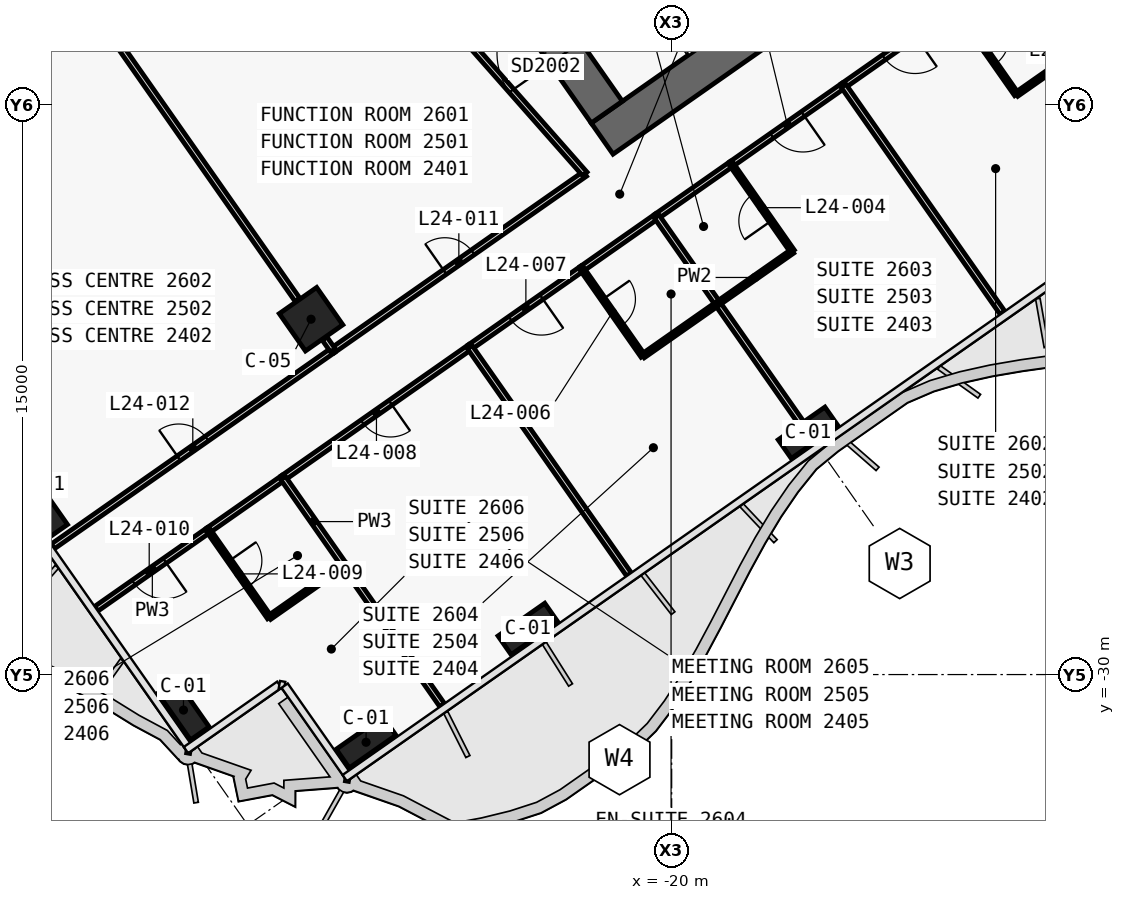
"""IFC4 building model, lengths in metres.
Left out: names, types, materials, properties, quantities, classifications, styles, units other than length and angle.
Written with IfcOpenShell. Run it as: python <this file> out.ifc"""

import sys

from ifc_helpers import new_model, si_unit, direction, frame, frame_2d, origin, origin_2d, place, context, subcontext, project, spatial, polyline, rectangle, outline, extrude, element, fill, save


model = new_model("IFC4")
c1 = context("Model", 3, precision=1e-05, world=origin(), true_north=direction((0.0, 1.0)))
c2 = subcontext(c1, "Body", "Model", "MODEL_VIEW")
j1 = project(units=[si_unit("LENGTHUNIT", "METRE"), si_unit("PLANEANGLEUNIT", "RADIAN")], contexts=[c1])
p1 = place(None, origin())
s1 = spatial("IfcSite", under=j1, at=p1, CompositionType="ELEMENT")
p2 = place(p1, origin())
s2 = spatial("IfcBuilding", under=s1, at=p2, CompositionType="ELEMENT")
p3 = place(p2, frame((0.0, 0.0, 112.1)))
s3 = spatial("IfcBuildingStorey", under=s2, at=p3, CompositionType="ELEMENT", Elevation=112.1)
p4 = place(p3, frame((0.037, -0.585, 0.0), z_axis=(0.0, 0.0, 1.0), x_axis=(-0.819157152511, -0.573569140985, 0.0)))
e1 = element("IfcWall", 1, at=p4, inside=s3, PredefinedType="SHEAR", context=c2, shape_type="SweptSolid", body=[
    extrude(outline(polyline([(26.695, 0.5), (0.7, 0.5), (0.0, -0.5), (26.695, -0.5), (26.695, 0.5)])), origin(), (0.0, 0.0, 1.0), 3.6),
])
p5 = place(p4, frame((2.995, 0.0, 0.0)))
e2 = element("IfcOpeningElement", 2, at=p5, cuts=e1, PredefinedType="OPENING", context=c2, shape_type="SweptSolid", body=[
    extrude(rectangle(XDim=2.4, YDim=2.1, at=frame_2d((1.2, 1.05))), frame((0.0, 0.51, 0.0), z_axis=(0.0, -1.0, 0.0), x_axis=(1.0, 0.0, 0.0)), (0.0, 0.0, 1.0), 1.02),
])
p6 = place(p4, frame((11.995, 0.0, 0.0)))
e3 = element("IfcOpeningElement", 3, at=p6, cuts=e1, PredefinedType="OPENING", context=c2, shape_type="SweptSolid", body=[
    extrude(rectangle(XDim=2.4, YDim=2.1, at=frame_2d((1.2, 1.05))), frame((0.0, 0.51, 0.0), z_axis=(0.0, -1.0, 0.0), x_axis=(1.0, 0.0, 0.0)), (0.0, 0.0, 1.0), 1.02),
])
p7 = place(p3, frame((-21.708, -15.2, 0.0), z_axis=(0.0, 0.0, 1.0), x_axis=(-0.573576324356, 0.819152122709, 0.0)))
e4 = element("IfcWall", 4, at=p7, inside=s3, PredefinedType="SHEAR", context=c2, shape_type="SweptSolid", body=[
    extrude(outline(polyline([(0.0, 0.5), (0.0, -0.5), (9.2, -0.5), (9.2, 0.5), (0.0, 0.5)])), origin(), (0.0, 0.0, 1.0), 3.6),
])
p8 = place(p7, frame((6.1, 0.0, 0.0)))
e5 = element("IfcOpeningElement", 5, at=p8, cuts=e4, PredefinedType="OPENING", context=c2, shape_type="SweptSolid", body=[
    extrude(rectangle(XDim=1.8, YDim=2.1, at=frame_2d((0.9, 1.05))), frame((0.0, 0.51, 0.0), z_axis=(0.0, -1.0, 0.0), x_axis=(1.0, 0.0, 0.0)), (0.0, 0.0, 1.0), 1.02),
])
p9 = place(p7, frame((1.9, 0.0, 0.0)))
e6 = element("IfcOpeningElement", 6, at=p9, cuts=e4, PredefinedType="OPENING", context=c2, shape_type="SweptSolid", body=[
    extrude(rectangle(XDim=1.8, YDim=2.1, at=frame_2d((0.9, 1.05))), frame((0.0, 0.51, 0.0), z_axis=(0.0, -1.0, 0.0), x_axis=(1.0, 0.0, 0.0)), (0.0, 0.0, 1.0), 1.02),
])
for number, where, z_axis, x_axis in (
    (7, (-16.41, -23.637, 0.0), (0.0, 0.0, 1.0), (-0.819, -0.574, 0.0)),
    (8, (-23.782, -28.799, 0.0), (0.0, 0.0, 1.0), (-0.819, -0.574, 0.0)),
    (9, (-28.042, -31.782, 0.0), (0.0, 0.0, 1.0), (-0.819, -0.574, 0.0)),
    (10, (-32.847, -30.935, 0.0), (0.0, 0.0, 1.0), (-0.574, 0.819, 0.0)),
    (11, (-36.575, -25.61, 0.0), (0.0, 0.0, 1.0), (-0.574, 0.819, 0.0)),
):
    element("IfcColumn", number, at=place(p3, frame(where, z_axis=z_axis, x_axis=x_axis)), inside=s3, PredefinedType="COLUMN", context=c2, shape_type="SweptSolid", body=[
        extrude(rectangle(XDim=1.5, YDim=0.6, at=origin_2d()), origin(), (0.0, 0.0, 1.0), 3.6),
    ])
p10 = place(p3, frame((-29.49, -20.649, 0.0), z_axis=(0.0, 0.0, 1.0), x_axis=(-0.819152044289, -0.573576436351, 0.0)))
e12 = element("IfcColumn", 12, at=p10, inside=s3, PredefinedType="COLUMN", context=c2, shape_type="SweptSolid", body=[
    extrude(rectangle(XDim=1.2, YDim=1.2, at=origin_2d()), origin(), (0.0, 0.0, 1.0), 3.6),
])
p11 = place(p3, frame((-28.917, -21.469, 0.0), z_axis=(0.0, 0.0, 1.0), x_axis=(0.819152599934, 0.573575642807, 0.0)))
e13 = element("IfcWall", 13, at=p11, inside=s3, PredefinedType="PARTITIONING", context=c2, shape_type="SweptSolid", body=[
    extrude(rectangle(XDim=8.098, YDim=0.15, at=frame_2d((4.049, 0.0))), origin(), (0.0, 0.0, 1.0), 2.6),
])
p12 = place(p11, frame((3.599, 0.0, 0.0)))
e14 = element("IfcOpeningElement", 14, at=p12, cuts=e13, PredefinedType="OPENING", context=c2, shape_type="SweptSolid", body=[
    extrude(rectangle(XDim=0.9, YDim=2.1, at=frame_2d((0.45, 1.05))), frame((0.0, 0.085, 0.0), z_axis=(0.0, -1.0, 0.0), x_axis=(1.0, 0.0, 0.0)), (0.0, 0.0, 1.0), 0.17),
])
p13 = place(p3, frame((-36.288, -26.63, 0.0), z_axis=(0.0, 0.0, 1.0), x_axis=(0.81915291695, 0.57357519006, 0.0)))
e15 = element("IfcWall", 15, at=p13, inside=s3, PredefinedType="PARTITIONING", context=c2, shape_type="SweptSolid", body=[
    extrude(rectangle(XDim=9.002, YDim=0.15, at=frame_2d((4.501, 0.0))), origin(), (0.0, 0.0, 1.0), 2.5),
])
p14 = place(p13, frame((4.051, 0.0, 0.0)))
e16 = element("IfcOpeningElement", 16, at=p14, cuts=e15, PredefinedType="OPENING", context=c2, shape_type="SweptSolid", body=[
    extrude(rectangle(XDim=0.9, YDim=2.1, at=frame_2d((0.45, 1.05))), frame((0.0, 0.085, 0.0), z_axis=(0.0, -1.0, 0.0), x_axis=(1.0, 0.0, 0.0)), (0.0, 0.0, 1.0), 0.17),
])
p15 = place(p3, frame((-12.532, -12.437, 0.0), z_axis=(0.0, 0.0, 1.0), x_axis=(-0.819145961204, -0.573585123798, 0.0)))
e17 = element("IfcWall", 17, at=p15, inside=s3, PredefinedType="PARTITIONING", context=c2, shape_type="SweptSolid", body=[
    extrude(rectangle(XDim=3.603, YDim=0.15, at=frame_2d((1.802, 0.0))), origin(), (0.0, 0.0, 1.0), 2.6),
])
p16 = place(p15, frame((1.301, 0.0, 0.0)))
e18 = element("IfcOpeningElement", 18, at=p16, cuts=e17, PredefinedType="OPENING", context=c2, shape_type="SweptSolid", body=[
    extrude(rectangle(XDim=1.0, YDim=2.1, at=frame_2d((0.5, 1.05))), frame((0.0, 0.085, 0.0), z_axis=(0.0, -1.0, 0.0), x_axis=(1.0, 0.0, 0.0)), (0.0, 0.0, 1.0), 0.17),
])
p17 = place(p3, frame((-15.48, -14.501, 0.0), z_axis=(0.0, 0.0, 1.0), x_axis=(-0.819145961204, -0.573585123798, 0.0)))
e19 = element("IfcWall", 19, at=p17, inside=s3, PredefinedType="PARTITIONING", context=c2, shape_type="SweptSolid", body=[
    extrude(rectangle(XDim=3.603, YDim=0.15, at=frame_2d((1.802, 0.0))), origin(), (0.0, 0.0, 1.0), 3.32),
])
p18 = place(p17, frame((1.302, 0.0, 0.0)))
e20 = element("IfcOpeningElement", 20, at=p18, cuts=e19, PredefinedType="OPENING", context=c2, shape_type="SweptSolid", body=[
    extrude(rectangle(XDim=1.0, YDim=2.1, at=frame_2d((0.5, 1.05))), frame((0.0, 0.085, 0.0), z_axis=(0.0, -1.0, 0.0), x_axis=(1.0, 0.0, 0.0)), (0.0, 0.0, 1.0), 0.17),
])
p19 = place(p3, frame((-18.429, -16.566, 0.0), z_axis=(0.0, 0.0, 1.0), x_axis=(-0.819146032251, -0.573585022335, 0.0)))
e21 = element("IfcWall", 21, at=p19, inside=s3, PredefinedType="PARTITIONING", context=c2, shape_type="SweptSolid", body=[
    extrude(rectangle(XDim=2.404, YDim=0.15, at=frame_2d((1.202, 0.0))), origin(), (0.0, 0.0, 1.0), 2.6),
])
p20 = place(p3, frame((-22.362, -19.32, 0.0), z_axis=(0.0, 0.0, 1.0), x_axis=(-0.819145961204, -0.573585123798, 0.0)))
e22 = element("IfcWall", 22, at=p20, inside=s3, PredefinedType="PARTITIONING", context=c2, shape_type="SweptSolid", body=[
    extrude(rectangle(XDim=3.603, YDim=0.15, at=frame_2d((1.802, 0.0))), origin(), (0.0, 0.0, 1.0), 3.32),
])
p21 = place(p20, frame((1.301, 0.0, 0.0)))
e23 = element("IfcOpeningElement", 23, at=p21, cuts=e22, PredefinedType="OPENING", context=c2, shape_type="SweptSolid", body=[
    extrude(rectangle(XDim=1.0, YDim=2.1, at=frame_2d((0.5, 1.05))), frame((0.0, 0.085, 0.0), z_axis=(0.0, -1.0, 0.0), x_axis=(1.0, 0.0, 0.0)), (0.0, 0.0, 1.0), 0.17),
])
p22 = place(p3, frame((-20.395, -17.943, 0.0), z_axis=(0.0, 0.0, 1.0), x_axis=(-0.819146032251, -0.573585022335, 0.0)))
e24 = element("IfcWall", 24, at=p22, inside=s3, PredefinedType="PARTITIONING", context=c2, shape_type="SweptSolid", body=[
    extrude(rectangle(XDim=2.404, YDim=0.15, at=frame_2d((1.202, 0.0))), origin(), (0.0, 0.0, 1.0), 2.6),
])
p23 = place(p3, frame((-25.31, -21.384, 0.0), z_axis=(0.0, 0.0, 1.0), x_axis=(-0.819145946981, -0.573585144111, 0.0)))
e25 = element("IfcWall", 25, at=p23, inside=s3, PredefinedType="PARTITIONING", context=c2, shape_type="SweptSolid", body=[
    extrude(rectangle(XDim=6.004, YDim=0.15, at=frame_2d((3.002, 0.0))), origin(), (0.0, 0.0, 1.0), 2.6),
])
p24 = place(p23, frame((2.552, 0.0, 0.0)))
e26 = element("IfcOpeningElement", 26, at=p24, cuts=e25, PredefinedType="OPENING", context=c2, shape_type="SweptSolid", body=[
    extrude(rectangle(XDim=0.9, YDim=2.1, at=frame_2d((0.45, 1.05))), frame((0.0, 0.085, 0.0), z_axis=(0.0, -1.0, 0.0), x_axis=(1.0, 0.0, 0.0)), (0.0, 0.0, 1.0), 0.17),
])
p25 = place(p3, frame((-32.191, -26.203, 0.0), z_axis=(0.0, 0.0, 1.0), x_axis=(-0.819149096931, -0.573580645591, 0.0)))
e27 = element("IfcWall", 27, at=p25, inside=s3, PredefinedType="PARTITIONING", context=c2, shape_type="SweptSolid", body=[
    extrude(rectangle(XDim=3.601, YDim=0.15, at=frame_2d((1.8, 0.0))), origin(), (0.0, 0.0, 1.0), 2.5),
])
p26 = place(p25, frame((1.401, 0.0, 0.0)))
e28 = element("IfcOpeningElement", 28, at=p26, cuts=e27, PredefinedType="OPENING", context=c2, shape_type="SweptSolid", body=[
    extrude(rectangle(XDim=1.0, YDim=2.1, at=frame_2d((0.5, 1.05))), frame((0.0, 0.085, 0.0), z_axis=(0.0, -1.0, 0.0), x_axis=(1.0, 0.0, 0.0)), (0.0, 0.0, 1.0), 0.17),
])
p27 = place(p3, frame((-30.225, -24.826, 0.0), z_axis=(0.0, 0.0, 1.0), x_axis=(-0.819146032251, -0.573585022335, 0.0)))
e29 = element("IfcWall", 29, at=p27, inside=s3, PredefinedType="PARTITIONING", context=c2, shape_type="SweptSolid", body=[
    extrude(rectangle(XDim=2.404, YDim=0.15, at=frame_2d((1.202, 0.0))), origin(), (0.0, 0.0, 1.0), 3.32),
])
p28 = place(p3, frame((-22.284, -16.827, 0.0), z_axis=(0.0, 0.0, 1.0), x_axis=(-0.661545117561, 0.749905365651, 0.0)))
e30 = element("IfcWall", 30, at=p28, inside=s3, PredefinedType="PARTITIONING", context=c2, shape_type="SweptSolid", body=[
    extrude(rectangle(XDim=6.543, YDim=0.15, at=frame_2d((3.271, 0.0))), origin(), (0.0, 0.0, 1.0), 2.6),
])
p29 = place(p3, frame((-28.916, -21.468, 0.0), z_axis=(0.0, 0.0, 1.0), x_axis=(-0.572944929411, 0.819593867633, 0.0)))
e31 = element("IfcWall", 31, at=p29, inside=s3, PredefinedType="PARTITIONING", context=c2, shape_type="SweptSolid", body=[
    extrude(rectangle(XDim=0.38, YDim=0.15, at=frame_2d((0.19, 0.0))), origin(), (0.0, 0.0, 1.0), 2.6),
])
p30 = place(p3, frame((-29.845, -20.141, 0.0), z_axis=(0.0, 0.0, 1.0), x_axis=(-0.573558725113, 0.819164445546, 0.0)))
e32 = element("IfcWall", 32, at=p30, inside=s3, PredefinedType="PARTITIONING", context=c2, shape_type="SweptSolid", body=[
    extrude(rectangle(XDim=9.01, YDim=0.15, at=frame_2d((4.505, 0.0))), origin(), (0.0, 0.0, 1.0), 2.6),
])
p31 = place(p3, frame((-12.533, -12.438, 0.0), z_axis=(0.0, 0.0, 1.0), x_axis=(0.573550118428, -0.819170471667, 0.0)))
e33 = element("IfcWall", 33, at=p31, inside=s3, PredefinedType="PARTITIONING", context=c2, shape_type="SweptSolid", body=[
    extrude(rectangle(XDim=2.8, YDim=0.12, at=frame_2d((1.4, 0.0))), origin(), (0.0, 0.0, 1.0), 3.32),
])
p32 = place(p31, frame((0.975, 0.0, 0.0)))
e34 = element("IfcOpeningElement", 34, at=p32, cuts=e33, PredefinedType="OPENING", context=c2, shape_type="SweptSolid", body=[
    extrude(rectangle(XDim=0.85, YDim=2.05, at=frame_2d((0.425, 1.025))), frame((0.0, 0.07, 0.0), z_axis=(0.0, -1.0, 0.0), x_axis=(1.0, 0.0, 0.0)), (0.0, 0.0, 1.0), 0.14),
])
p33 = place(p3, frame((-10.926, -14.732, 0.0), z_axis=(0.0, 0.0, 1.0), x_axis=(0.819107643868, 0.573639841501, 0.0)))
e35 = element("IfcWall", 35, at=p33, inside=s3, PredefinedType="PARTITIONING", context=c2, shape_type="SweptSolid", body=[
    extrude(rectangle(XDim=2.4, YDim=0.12, at=frame_2d((1.2, 0.0))), origin(), (0.0, 0.0, 1.0), 3.32),
])
p34 = place(p3, frame((-11.294, -20.482, 0.0), z_axis=(0.0, 0.0, 1.0), x_axis=(-0.573572324301, 0.819154923562, 0.0)))
e36 = element("IfcWall", 36, at=p34, inside=s3, PredefinedType="PARTITIONING", context=c2, shape_type="SweptSolid", body=[
    extrude(rectangle(XDim=7.3, YDim=0.15, at=frame_2d((3.65, 0.0))), origin(), (0.0, 0.0, 1.0), 2.5),
])
p35 = place(p3, frame((-18.79, -20.239, 0.0), z_axis=(0.0, 0.0, 1.0), x_axis=(0.819141114317, 0.573592045652, 0.0)))
e37 = element("IfcWall", 37, at=p35, inside=s3, PredefinedType="PARTITIONING", context=c2, shape_type="SweptSolid", body=[
    extrude(rectangle(XDim=2.4, YDim=0.12, at=frame_2d((1.2, 0.0))), origin(), (0.0, 0.0, 1.0), 2.6),
])
p36 = place(p3, frame((-16.823, -18.861, 0.0), z_axis=(0.0, 0.0, 1.0), x_axis=(-0.573608623498, 0.819129505664, 0.0)))
e38 = element("IfcWall", 38, at=p36, inside=s3, PredefinedType="PARTITIONING", context=c2, shape_type="SweptSolid", body=[
    extrude(rectangle(XDim=2.8, YDim=0.12, at=frame_2d((1.4, 0.0))), origin(), (0.0, 0.0, 1.0), 3.32),
])
p37 = place(p36, frame((0.975, 0.0, 0.0)))
e39 = element("IfcOpeningElement", 39, at=p37, cuts=e38, PredefinedType="OPENING", context=c2, shape_type="SweptSolid", body=[
    extrude(rectangle(XDim=0.85, YDim=2.05, at=frame_2d((0.425, 1.025))), frame((0.0, 0.07, 0.0), z_axis=(0.0, -1.0, 0.0), x_axis=(1.0, 0.0, 0.0)), (0.0, 0.0, 1.0), 0.14),
])
p38 = place(p3, frame((-16.594, -23.375, 0.0), z_axis=(0.0, 0.0, 1.0), x_axis=(-0.573594994199, 0.819139049631, 0.0)))
e40 = element("IfcWall", 40, at=p38, inside=s3, PredefinedType="PARTITIONING", context=c2, shape_type="SweptSolid", body=[
    extrude(rectangle(XDim=3.829, YDim=0.15, at=frame_2d((1.915, 0.0))), origin(), (0.0, 0.0, 1.0), 2.6),
])
p39 = place(p3, frame((-18.79, -20.238, 0.0), z_axis=(0.0, 0.0, 1.0), x_axis=(-0.57364959175, 0.819100815459, 0.0)))
e41 = element("IfcWall", 41, at=p39, inside=s3, PredefinedType="PARTITIONING", context=c2, shape_type="SweptSolid", body=[
    extrude(rectangle(XDim=2.8, YDim=0.15, at=frame_2d((1.4, 0.0))), origin(), (0.0, 0.0, 1.0), 2.6),
])
p40 = place(p3, frame((-22.363, -19.321, 0.0), z_axis=(0.0, 0.0, 1.0), x_axis=(0.57364959175, -0.819100815459, 0.0)))
e42 = element("IfcWall", 42, at=p40, inside=s3, PredefinedType="PARTITIONING", context=c2, shape_type="SweptSolid", body=[
    extrude(rectangle(XDim=2.8, YDim=0.12, at=frame_2d((1.4, 0.0))), origin(), (0.0, 0.0, 1.0), 3.32),
])
p41 = place(p40, frame((0.975, 0.0, 0.0)))
e43 = element("IfcOpeningElement", 43, at=p41, cuts=e42, PredefinedType="OPENING", context=c2, shape_type="SweptSolid", body=[
    extrude(rectangle(XDim=0.85, YDim=2.05, at=frame_2d((0.425, 1.025))), frame((0.0, 0.07, 0.0), z_axis=(0.0, -1.0, 0.0), x_axis=(1.0, 0.0, 0.0)), (0.0, 0.0, 1.0), 0.14),
])
p42 = place(p3, frame((-20.756, -21.615, 0.0), z_axis=(0.0, 0.0, 1.0), x_axis=(0.819188907105, 0.573523787192, 0.0)))
e44 = element("IfcWall", 44, at=p42, inside=s3, PredefinedType="PARTITIONING", context=c2, shape_type="SweptSolid", body=[
    extrude(rectangle(XDim=2.4, YDim=0.12, at=frame_2d((1.2, 0.0))), origin(), (0.0, 0.0, 1.0), 2.6),
])
p43 = place(p3, frame((-21.124, -27.365, 0.0), z_axis=(0.0, 0.0, 1.0), x_axis=(-0.573572324301, 0.819154923562, 0.0)))
e45 = element("IfcWall", 45, at=p43, inside=s3, PredefinedType="PARTITIONING", context=c2, shape_type="SweptSolid", body=[
    extrude(rectangle(XDim=7.3, YDim=0.15, at=frame_2d((3.65, 0.0))), origin(), (0.0, 0.0, 1.0), 2.5),
])
p44 = place(p3, frame((-26.039, -30.807, 0.0), z_axis=(0.0, 0.0, 1.0), x_axis=(-0.573593387921, 0.81914017441, 0.0)))
e46 = element("IfcWall", 46, at=p44, inside=s3, PredefinedType="PARTITIONING", context=c2, shape_type="SweptSolid", body=[
    extrude(rectangle(XDim=4.501, YDim=0.15, at=frame_2d((2.25, 0.0))), origin(), (0.0, 0.0, 1.0), 2.5),
])
p45 = place(p3, frame((-28.619, -27.122, 0.0), z_axis=(0.0, 0.0, 1.0), x_axis=(-0.573614360281, 0.819125488359, 0.0)))
e47 = element("IfcWall", 47, at=p45, inside=s3, PredefinedType="PARTITIONING", context=c2, shape_type="SweptSolid", body=[
    extrude(rectangle(XDim=2.802, YDim=0.15, at=frame_2d((1.401, 0.0))), origin(), (0.0, 0.0, 1.0), 3.32),
])
p46 = place(p3, frame((-32.193, -26.204, 0.0), z_axis=(0.0, 0.0, 1.0), x_axis=(0.573608623498, -0.819129505664, 0.0)))
e48 = element("IfcWall", 48, at=p46, inside=s3, PredefinedType="PARTITIONING", context=c2, shape_type="SweptSolid", body=[
    extrude(rectangle(XDim=2.8, YDim=0.12, at=frame_2d((1.4, 0.0))), origin(), (0.0, 0.0, 1.0), 3.32),
])
p47 = place(p46, frame((0.975, 0.0, 0.0)))
e49 = element("IfcOpeningElement", 49, at=p47, cuts=e48, PredefinedType="OPENING", context=c2, shape_type="SweptSolid", body=[
    extrude(rectangle(XDim=0.85, YDim=2.05, at=frame_2d((0.425, 1.025))), frame((0.0, 0.07, 0.0), z_axis=(0.0, -1.0, 0.0), x_axis=(1.0, 0.0, 0.0)), (0.0, 0.0, 1.0), 0.14),
])
p48 = place(p3, frame((-30.586, -28.498, 0.0), z_axis=(0.0, 0.0, 1.0), x_axis=(0.819141114317, 0.573592045652, 0.0)))
e50 = element("IfcWall", 50, at=p48, inside=s3, PredefinedType="PARTITIONING", context=c2, shape_type="SweptSolid", body=[
    extrude(rectangle(XDim=2.4, YDim=0.12, at=frame_2d((1.2, 0.0))), origin(), (0.0, 0.0, 1.0), 3.32),
])
p49 = place(p9, origin())
e51 = element("IfcDoor", 51, at=p49, inside=s3, OperationType="DOUBLE_DOOR_SINGLE_SWING", PredefinedType="DOOR", context=c2, shape_type="SweptSolid", body=[
    extrude(rectangle(XDim=1.8, YDim=2.1, at=frame_2d((0.9, 1.05))), frame((0.0, 0.025, 0.0), z_axis=(0.0, -1.0, 0.0), x_axis=(1.0, 0.0, 0.0)), (0.0, 0.0, 1.0), 0.05),
])
fill(e6, e51)
p50 = place(p32, origin())
e52 = element("IfcDoor", 52, at=p50, inside=s3, OperationType="SINGLE_SWING_RIGHT", PredefinedType="DOOR", context=c2, shape_type="SweptSolid", body=[
    extrude(rectangle(XDim=0.85, YDim=2.05, at=frame_2d((0.425, 1.025))), frame((0.0, 0.025, 0.0), z_axis=(0.0, -1.0, 0.0), x_axis=(1.0, 0.0, 0.0)), (0.0, 0.0, 1.0), 0.05),
])
fill(e34, e52)
p51 = place(p16, origin())
e53 = element("IfcDoor", 53, at=p51, inside=s3, OperationType="SINGLE_SWING_LEFT", PredefinedType="DOOR", context=c2, shape_type="SweptSolid", body=[
    extrude(rectangle(XDim=1.0, YDim=2.1, at=frame_2d((0.5, 1.05))), frame((0.0, 0.025, 0.0), z_axis=(0.0, -1.0, 0.0), x_axis=(1.0, 0.0, 0.0)), (0.0, 0.0, 1.0), 0.05),
])
fill(e18, e53)
p52 = place(p37, origin())
e54 = element("IfcDoor", 54, at=p52, inside=s3, OperationType="SINGLE_SWING_RIGHT", PredefinedType="DOOR", context=c2, shape_type="SweptSolid", body=[
    extrude(rectangle(XDim=0.85, YDim=2.05, at=frame_2d((0.425, 1.025))), frame((0.0, 0.025, 0.0), z_axis=(0.0, -1.0, 0.0), x_axis=(1.0, 0.0, 0.0)), (0.0, 0.0, 1.0), 0.05),
])
fill(e39, e54)
p53 = place(p18, origin())
e55 = element("IfcDoor", 55, at=p53, inside=s3, OperationType="SINGLE_SWING_LEFT", PredefinedType="DOOR", context=c2, shape_type="SweptSolid", body=[
    extrude(rectangle(XDim=1.0, YDim=2.1, at=frame_2d((0.5, 1.05))), frame((0.0, 0.025, 0.0), z_axis=(0.0, -1.0, 0.0), x_axis=(1.0, 0.0, 0.0)), (0.0, 0.0, 1.0), 0.05),
])
fill(e20, e55)
p54 = place(p41, origin())
e56 = element("IfcDoor", 56, at=p54, inside=s3, OperationType="SINGLE_SWING_RIGHT", PredefinedType="DOOR", context=c2, shape_type="SweptSolid", body=[
    extrude(rectangle(XDim=0.85, YDim=2.05, at=frame_2d((0.425, 1.025))), frame((0.0, 0.025, 0.0), z_axis=(0.0, -1.0, 0.0), x_axis=(1.0, 0.0, 0.0)), (0.0, 0.0, 1.0), 0.05),
])
fill(e43, e56)
p55 = place(p21, origin())
e57 = element("IfcDoor", 57, at=p55, inside=s3, OperationType="SINGLE_SWING_LEFT", PredefinedType="DOOR", context=c2, shape_type="SweptSolid", body=[
    extrude(rectangle(XDim=1.0, YDim=2.1, at=frame_2d((0.5, 1.05))), frame((0.0, 0.025, 0.0), z_axis=(0.0, -1.0, 0.0), x_axis=(1.0, 0.0, 0.0)), (0.0, 0.0, 1.0), 0.05),
])
fill(e23, e57)
p56 = place(p24, origin())
e58 = element("IfcDoor", 58, at=p56, inside=s3, OperationType="SINGLE_SWING_RIGHT", PredefinedType="DOOR", context=c2, shape_type="SweptSolid", body=[
    extrude(rectangle(XDim=0.9, YDim=2.1, at=frame_2d((0.45, 1.05))), frame((0.0, 0.025, 0.0), z_axis=(0.0, -1.0, 0.0), x_axis=(1.0, 0.0, 0.0)), (0.0, 0.0, 1.0), 0.05),
])
fill(e26, e58)
p57 = place(p47, origin())
e59 = element("IfcDoor", 59, at=p57, inside=s3, OperationType="SINGLE_SWING_LEFT", PredefinedType="DOOR", context=c2, shape_type="SweptSolid", body=[
    extrude(rectangle(XDim=0.85, YDim=2.05, at=frame_2d((0.425, 1.025))), frame((0.0, 0.025, 0.0), z_axis=(0.0, -1.0, 0.0), x_axis=(1.0, 0.0, 0.0)), (0.0, 0.0, 1.0), 0.05),
])
fill(e49, e59)
p58 = place(p26, origin())
e60 = element("IfcDoor", 60, at=p58, inside=s3, OperationType="SINGLE_SWING_LEFT", PredefinedType="DOOR", context=c2, shape_type="SweptSolid", body=[
    extrude(rectangle(XDim=1.0, YDim=2.1, at=frame_2d((0.5, 1.05))), frame((0.0, 0.025, 0.0), z_axis=(0.0, -1.0, 0.0), x_axis=(1.0, 0.0, 0.0)), (0.0, 0.0, 1.0), 0.05),
])
fill(e28, e60)
p59 = place(p12, origin())
e61 = element("IfcDoor", 61, at=p59, inside=s3, OperationType="SINGLE_SWING_LEFT", PredefinedType="DOOR", context=c2, shape_type="SweptSolid", body=[
    extrude(rectangle(XDim=0.9, YDim=2.1, at=frame_2d((0.45, 1.05))), frame((0.0, 0.025, 0.0), z_axis=(0.0, -1.0, 0.0), x_axis=(1.0, 0.0, 0.0)), (0.0, 0.0, 1.0), 0.05),
])
fill(e14, e61)
p60 = place(p14, origin())
e62 = element("IfcDoor", 62, at=p60, inside=s3, OperationType="SINGLE_SWING_LEFT", PredefinedType="DOOR", context=c2, shape_type="SweptSolid", body=[
    extrude(rectangle(XDim=0.9, YDim=2.1, at=frame_2d((0.45, 1.05))), frame((0.0, 0.025, 0.0), z_axis=(0.0, -1.0, 0.0), x_axis=(1.0, 0.0, 0.0)), (0.0, 0.0, 1.0), 0.05),
])
fill(e16, e62)
save(model, sys.argv[1])
